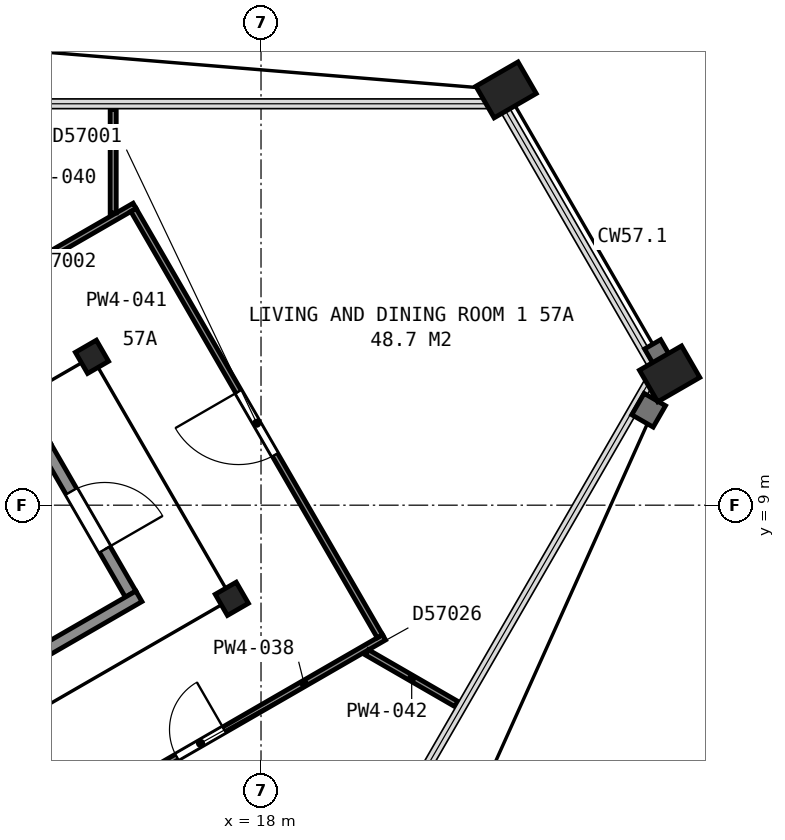
"""IFC4 building model, lengths in metres.
Left out: names, types, materials, properties, quantities, classifications, styles, units other than length and angle.
Written with IfcOpenShell. Run it as: python <this file> out.ifc"""

import sys

from ifc_helpers import new_model, si_unit, direction, frame, frame_2d, origin, origin_2d, place, context, subcontext, project, spatial, rectangle, hollow_rectangle, i_section, extrude, element, fill, save


model = new_model("IFC4")
c1 = context("Model", 3, precision=1e-05, world=origin(), true_north=direction((0.0, 1.0)))
c2 = subcontext(c1, "Body", "Model", "MODEL_VIEW")
j1 = project(units=[si_unit("LENGTHUNIT", "METRE"), si_unit("PLANEANGLEUNIT", "RADIAN")], contexts=[c1])
p1 = place(None, origin())
s1 = spatial("IfcSite", under=j1, at=p1, CompositionType="ELEMENT")
p2 = place(p1, origin())
s2 = spatial("IfcBuilding", under=s1, at=p2, CompositionType="ELEMENT")
p3 = place(p2, frame((0.0, 0.0, 228.6)))
s3 = spatial("IfcBuildingStorey", under=s2, at=p3, CompositionType="ELEMENT", Elevation=228.6)
for number, where, z_axis, x_axis in (
    (1, (22.03, 15.83, 0.0), (0.0, 0.0, 1.0), (0.5, -0.866, 0.0)),
    (2, (24.72, 11.16, 0.0), (0.0, 0.0, 1.0), (0.5, -0.866, 0.0)),
):
    element("IfcColumn", number, at=place(p3, frame(where, z_axis=z_axis, x_axis=x_axis)), inside=s3, PredefinedType="COLUMN", context=c2, shape_type="SweptSolid", body=[
        extrude(hollow_rectangle(XDim=0.6, YDim=0.8, WallThickness=0.05, at=origin_2d()), origin(), (0.0, 0.0, 1.0), 3.635),
    ])
for number, where, z_axis, x_axis in (
    (3, (17.52, 7.46, 0.0), (0.0, 0.0, 1.0), (0.5, -0.866, 0.0)),
    (4, (15.22, 11.44, 0.0), (0.0, 0.0, 1.0), (0.5, -0.866, 0.0)),
):
    element("IfcColumn", number, at=place(p3, frame(where, z_axis=z_axis, x_axis=x_axis)), inside=s3, PredefinedType="COLUMN", context=c2, shape_type="SweptSolid", body=[
        extrude(i_section(OverallWidth=0.401, OverallDepth=0.399, WebThickness=0.025, FlangeThickness=0.04, FilletRadius=0.015, at=origin_2d()), origin(), (0.0, 0.0, 1.0), 3.7),
    ])
p4 = place(p3, frame((15.855, 7.538, 0.0), z_axis=(0.0, 0.0, 1.0), x_axis=(-0.500049511043, 0.865996816683, 0.0)))
e5 = element("IfcWall", 5, at=p4, inside=s3, PredefinedType="PARTITIONING", context=c2, shape_type="SweptSolid", body=[
    extrude(rectangle(XDim=2.8, YDim=0.2, at=frame_2d((1.4, 0.0))), origin(), (0.0, 0.0, 1.0), 3.45),
])
p5 = place(p4, frame((0.85, 0.0, 0.0)))
e6 = element("IfcOpeningElement", 6, at=p5, cuts=e5, PredefinedType="OPENING", context=c2, shape_type="SweptSolid", body=[
    extrude(rectangle(XDim=1.1, YDim=2.1, at=frame_2d((0.55, 1.05))), frame((0.0, 0.11, 0.0), z_axis=(0.0, -1.0, 0.0), x_axis=(1.0, 0.0, 0.0)), (0.0, 0.0, 1.0), 0.22),
])
p6 = place(p3, frame((7.678, 2.701, 0.0), z_axis=(0.0, 0.0, 1.0), x_axis=(0.866019993635, 0.500009370536, 0.0)))
e7 = element("IfcWall", 7, at=p6, inside=s3, PredefinedType="PARTITIONING", context=c2, shape_type="SweptSolid", body=[
    extrude(rectangle(XDim=9.6, YDim=0.2, at=frame_2d((4.8, 0.0))), origin(), (0.0, 0.0, 1.0), 3.45),
])
p7 = place(p3, frame((8.852, 9.843, 0.0), z_axis=(0.0, 0.0, 1.0), x_axis=(0.866088973199, 0.499889878377, 0.0)))
e8 = element("IfcWall", 8, at=p7, inside=s3, PredefinedType="PARTITIONING", context=c2, shape_type="SweptSolid", body=[
    extrude(rectangle(XDim=8.163, YDim=0.1, at=frame_2d((4.082, 0.0))), origin(), (0.0, 0.0, 1.0), 2.713),
])
p8 = place(p7, frame((4.865, 0.0, 0.0)))
e9 = element("IfcOpeningElement", 9, at=p8, cuts=e8, PredefinedType="OPENING", context=c2, shape_type="SweptSolid", body=[
    extrude(rectangle(XDim=0.9, YDim=2.1, at=frame_2d((0.45, 1.05))), frame((0.0, 0.06, 0.0), z_axis=(0.0, -1.0, 0.0), x_axis=(1.0, 0.0, 0.0)), (0.0, 0.0, 1.0), 0.12),
])
p9 = place(p7, frame((0.965, 0.0, 0.0)))
e10 = element("IfcOpeningElement", 10, at=p9, cuts=e8, PredefinedType="OPENING", context=c2, shape_type="SweptSolid", body=[
    extrude(rectangle(XDim=0.9, YDim=2.1, at=frame_2d((0.45, 1.05))), frame((0.0, 0.06, 0.0), z_axis=(0.0, -1.0, 0.0), x_axis=(1.0, 0.0, 0.0)), (0.0, 0.0, 1.0), 0.12),
])
p10 = place(p3, frame((20.023, 6.826, 0.0), z_axis=(0.0, 0.0, 1.0), x_axis=(-0.86608949446, -0.499888975259, 0.0)))
e11 = element("IfcWall", 11, at=p10, inside=s3, PredefinedType="PARTITIONING", context=c2, shape_type="SweptSolid", body=[
    extrude(rectangle(XDim=8.165, YDim=0.1, at=frame_2d((4.083, 0.0))), origin(), (0.0, 0.0, 1.0), 2.713),
])
p11 = place(p10, frame((6.95, 0.0, 0.0)))
e12 = element("IfcOpeningElement", 12, at=p11, cuts=e11, PredefinedType="OPENING", context=c2, shape_type="SweptSolid", body=[
    extrude(rectangle(XDim=0.9, YDim=2.1, at=frame_2d((0.45, 1.05))), frame((0.0, 0.06, 0.0), z_axis=(0.0, -1.0, 0.0), x_axis=(1.0, 0.0, 0.0)), (0.0, 0.0, 1.0), 0.12),
])
p12 = place(p10, frame((3.035, 0.0, 0.0)))
e13 = element("IfcOpeningElement", 13, at=p12, cuts=e11, PredefinedType="OPENING", context=c2, shape_type="SweptSolid", body=[
    extrude(rectangle(XDim=0.9, YDim=2.1, at=frame_2d((0.45, 1.05))), frame((0.0, 0.06, 0.0), z_axis=(0.0, -1.0, 0.0), x_axis=(1.0, 0.0, 0.0)), (0.0, 0.0, 1.0), 0.12),
])
p13 = place(p3, frame((15.569, 13.807, 0.0), z_axis=(0.0, 0.0, 1.0), x_axis=(0.0, 1.0, 0.0)))
e14 = element("IfcWall", 14, at=p13, inside=s3, PredefinedType="PARTITIONING", context=c2, shape_type="SweptSolid", body=[
    extrude(rectangle(XDim=1.699, YDim=0.1, at=frame_2d((0.85, 0.0))), origin(), (0.0, 0.0, 1.0), 2.713),
])
p14 = place(p3, frame((15.903, 13.855, 0.0), z_axis=(0.0, 0.0, 1.0), x_axis=(0.500415732313, -0.865785247537, 0.0)))
e15 = element("IfcWall", 15, at=p14, inside=s3, PredefinedType="PARTITIONING", context=c2, shape_type="SweptSolid", body=[
    extrude(rectangle(XDim=8.097, YDim=0.1, at=frame_2d((4.049, 0.0))), origin(), (0.0, 0.0, 1.0), 2.713),
])
p15 = place(p14, frame((3.45, 0.0, 0.0)))
e16 = element("IfcOpeningElement", 16, at=p15, cuts=e15, PredefinedType="OPENING", context=c2, shape_type="SweptSolid", body=[
    extrude(rectangle(XDim=1.2, YDim=2.1, at=frame_2d((0.6, 1.05))), frame((0.0, 0.06, 0.0), z_axis=(0.0, -1.0, 0.0), x_axis=(1.0, 0.0, 0.0)), (0.0, 0.0, 1.0), 0.12),
])
p16 = place(p3, frame((19.743, 6.579, 0.0), z_axis=(0.0, 0.0, 1.0), x_axis=(0.866003515251, -0.500037910135, 0.0)))
e17 = element("IfcWall", 17, at=p16, inside=s3, PredefinedType="PARTITIONING", context=c2, shape_type="SweptSolid", body=[
    extrude(rectangle(XDim=1.697, YDim=0.1, at=frame_2d((0.849, 0.0))), origin(), (0.0, 0.0, 1.0), 2.713),
])
p17 = place(p5, origin())
e18 = element("IfcDoor", 18, at=p17, inside=s3, OperationType="SINGLE_SWING_LEFT", PredefinedType="DOOR", context=c2, shape_type="SweptSolid", body=[
    extrude(rectangle(XDim=1.1, YDim=2.1, at=frame_2d((0.55, 1.05))), frame((0.0, 0.025, 0.0), z_axis=(0.0, -1.0, 0.0), x_axis=(1.0, 0.0, 0.0)), (0.0, 0.0, 1.0), 0.05),
])
fill(e6, e18)
p18 = place(p12, origin())
e19 = element("IfcDoor", 19, at=p18, inside=s3, OperationType="SINGLE_SWING_LEFT", PredefinedType="DOOR", context=c2, shape_type="SweptSolid", body=[
    extrude(rectangle(XDim=0.9, YDim=2.1, at=frame_2d((0.45, 1.05))), frame((0.0, 0.025, 0.0), z_axis=(0.0, -1.0, 0.0), x_axis=(1.0, 0.0, 0.0)), (0.0, 0.0, 1.0), 0.05),
])
fill(e13, e19)
p19 = place(p15, origin())
e20 = element("IfcDoor", 20, at=p19, inside=s3, OperationType="SINGLE_SWING_LEFT", PredefinedType="DOOR", context=c2, shape_type="SweptSolid", body=[
    extrude(rectangle(XDim=1.2, YDim=2.1, at=frame_2d((0.6, 1.05))), frame((0.0, 0.025, 0.0), z_axis=(0.0, -1.0, 0.0), x_axis=(1.0, 0.0, 0.0)), (0.0, 0.0, 1.0), 0.05),
])
fill(e16, e20)
save(model, sys.argv[1])
